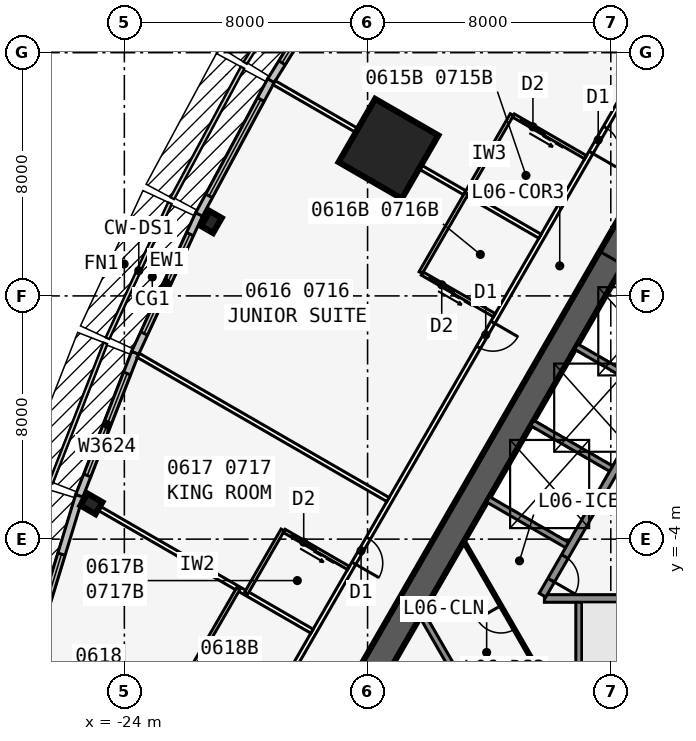
"""IFC4 building model, lengths in metres.
Left out: names, types, materials, properties, quantities, classifications, styles, units other than length and angle.
Written with IfcOpenShell. Run it as: python <this file> out.ifc"""

import sys

from ifc_helpers import new_model, si_unit, direction, frame, frame_2d, origin, origin_2d, place, context, subcontext, project, spatial, rectangle, i_section, extrude, element, fill, save


model = new_model("IFC4")
c1 = context("Model", 3, precision=1e-05, world=origin(), true_north=direction((0.0, 1.0)))
c2 = subcontext(c1, "Body", "Model", "MODEL_VIEW")
j1 = project(units=[si_unit("LENGTHUNIT", "METRE"), si_unit("PLANEANGLEUNIT", "RADIAN")], contexts=[c1])
p1 = place(None, origin())
s1 = spatial("IfcSite", under=j1, at=p1, CompositionType="ELEMENT")
p2 = place(p1, origin())
s2 = spatial("IfcBuilding", under=s1, at=p2, CompositionType="ELEMENT")
p3 = place(p2, frame((0.0, 0.0, 31.9)))
s3 = spatial("IfcBuildingStorey", under=s2, at=p3, CompositionType="ELEMENT", Elevation=31.9)
p4 = place(p3, frame((-10.183, -5.951, 0.0), z_axis=(0.0, 0.0, 1.0), x_axis=(1.0, 0.0, 0.0)))
e1 = element("IfcWall", 1, at=p4, inside=s3, PredefinedType="SOLIDWALL", context=c2, shape_type="SweptSolid", body=[
    extrude(rectangle(XDim=7.633, YDim=0.25, at=frame_2d((3.816, 0.0))), origin(), (0.0, 0.0, 1.0), 3.235),
])
p5 = place(p3, frame((-9.05, -5.951, 0.0), z_axis=(0.0, 0.0, 1.0), x_axis=(0.0, -1.0, 0.0)))
e2 = element("IfcWall", 2, at=p5, inside=s3, PredefinedType="SOLIDWALL", context=c2, shape_type="SweptSolid", body=[
    extrude(rectangle(XDim=3.125, YDim=0.2, at=frame_2d((1.562, 0.0))), origin(), (0.0, 0.0, 1.0), 3.235),
])
p6 = place(p3, frame((0.0, 19.052, 0.0), z_axis=(0.0, 0.0, 1.0), x_axis=(-0.499999749417, -0.866025548458, 0.0)))
e3 = element("IfcWall", 3, at=p6, inside=s3, PredefinedType="SHEAR", context=c2, shape_type="SweptSolid", body=[
    extrude(rectangle(XDim=33.0, YDim=0.9, at=frame_2d((16.5, 0.0))), origin(), (0.0, 0.0, 1.0), 3.4),
])
p7 = place(p6, frame((14.15, 0.0, 0.0)))
e4 = element("IfcOpeningElement", 4, at=p7, cuts=e3, PredefinedType="OPENING", context=c2, shape_type="SweptSolid", body=[
    extrude(rectangle(XDim=1.8, YDim=2.13, at=frame_2d((0.9, 1.065))), frame((0.0, 0.46, 0.0), z_axis=(0.0, -1.0, 0.0), x_axis=(1.0, 0.0, 0.0)), (0.0, 0.0, 1.0), 0.92),
])
p8 = place(p6, frame((12.6, 0.0, 0.0)))
e5 = element("IfcOpeningElement", 5, at=p8, cuts=e3, PredefinedType="OPENING", context=c2, shape_type="SweptSolid", body=[
    extrude(rectangle(XDim=1.0, YDim=2.13, at=frame_2d((0.5, 1.065))), frame((0.0, 0.46, 0.0), z_axis=(0.0, -1.0, 0.0), x_axis=(1.0, 0.0, 0.0)), (0.0, 0.0, 1.0), 0.92),
])
p9 = place(p3, frame((-4.929, 3.365, 0.0), z_axis=(0.0, 0.0, 1.0), x_axis=(-0.499991433582, -0.866030349552, 0.0)))
e6 = element("IfcWall", 6, at=p9, inside=s3, PredefinedType="SOLIDWALL", context=c2, shape_type="SweptSolid", body=[
    extrude(rectangle(XDim=10.633, YDim=0.25, at=frame_2d((5.316, 0.0))), origin(), (0.0, 0.0, 1.0), 3.235),
])
p10 = place(p9, frame((9.164, 0.0, 0.0)))
e7 = element("IfcOpeningElement", 7, at=p10, cuts=e6, PredefinedType="OPENING", context=c2, shape_type="SweptSolid", body=[
    extrude(rectangle(XDim=0.9, YDim=2.13, at=frame_2d((0.45, 1.065))), frame((0.0, 0.135, 0.0), z_axis=(0.0, -1.0, 0.0), x_axis=(1.0, 0.0, 0.0)), (0.0, 0.0, 1.0), 0.27),
])
for number, where, z_axis, x_axis in (
    (8, (-6.429, 0.767, 0.0), (0.0, 0.0, 1.0), (-0.866, 0.5, 0.0)),
    (9, (-7.879, -1.744, 0.0), (0.0, 0.0, 1.0), (-0.866, 0.5, 0.0)),
    (10, (-9.329, -4.256, 0.0), (0.0, 0.0, 1.0), (-0.866, 0.5, 0.0)),
):
    element("IfcWall", number, at=place(p3, frame(where, z_axis=z_axis, x_axis=x_axis)), inside=s3, PredefinedType="SOLIDWALL", context=c2, shape_type="SweptSolid", body=[
        extrude(rectangle(XDim=3.125, YDim=0.2, at=frame_2d((1.562, 0.0))), origin(), (0.0, 0.0, 1.0), 3.235),
    ])
for number, where, z_axis, x_axis in (
    (11, (-21.137, 6.43, 0.0), (0.0, 0.0, 1.0), (-0.866, 0.5, 0.0)),
    (12, (-25.083, -2.839, 0.0), (0.0, 0.0, 1.0), (-0.5, -0.866, 0.0)),
):
    element("IfcColumn", number, at=place(p3, frame(where, z_axis=z_axis, x_axis=x_axis)), inside=s3, PredefinedType="COLUMN", context=c2, shape_type="SweptSolid", body=[
        extrude(i_section(OverallWidth=0.455, OverallDepth=0.569, WebThickness=0.078, FlangeThickness=0.125, at=origin_2d()), origin(), (0.0, 0.0, 1.0), 3.4),
    ])
p11 = place(p3, frame((-15.312, 8.84, 0.0), z_axis=(0.0, 0.0, 1.0), x_axis=(-0.866025403784, 0.5, 0.0)))
e13 = element("IfcColumn", 13, at=p11, inside=s3, PredefinedType="COLUMN", context=c2, shape_type="SweptSolid", body=[
    extrude(rectangle(XDim=2.4, YDim=2.4, at=origin_2d()), origin(), (0.0, 0.0, 1.0), 3.4),
])
p12 = place(p3, frame((-16.551, 15.324, 0.0), z_axis=(0.0, 0.0, 1.0), x_axis=(-0.526132807704, -0.850402415717, 0.0)))
e14 = element("IfcWall", 14, at=p12, inside=s3, PredefinedType="STANDARD", context=c2, shape_type="SweptSolid", body=[
    extrude(rectangle(XDim=5.002, YDim=0.25, at=frame_2d((2.501, 0.0))), origin(), (0.0, 0.0, 1.0), 3.235),
])
p13 = place(p12, frame((0.701, 0.0, 0.45)))
e15 = element("IfcOpeningElement", 15, at=p13, cuts=e14, PredefinedType="OPENING", context=c2, shape_type="SweptSolid", body=[
    extrude(rectangle(XDim=3.6, YDim=2.4, at=frame_2d((1.8, 1.2))), frame((0.0, 0.135, 0.0), z_axis=(0.0, -1.0, 0.0), x_axis=(1.0, 0.0, 0.0)), (0.0, 0.0, 1.0), 0.27),
])
p14 = place(p3, frame((-19.178, 11.077, 0.0), z_axis=(0.0, 0.0, 1.0), x_axis=(-0.473412820489, -0.880840678782, 0.0)))
e16 = element("IfcWall", 16, at=p14, inside=s3, PredefinedType="STANDARD", context=c2, shape_type="SweptSolid", body=[
    extrude(rectangle(XDim=5.002, YDim=0.25, at=frame_2d((2.501, 0.0))), origin(), (0.0, 0.0, 1.0), 3.235),
])
p15 = place(p14, frame((0.701, 0.0, 0.45)))
e17 = element("IfcOpeningElement", 17, at=p15, cuts=e16, PredefinedType="OPENING", context=c2, shape_type="SweptSolid", body=[
    extrude(rectangle(XDim=3.6, YDim=2.4, at=frame_2d((1.8, 1.2))), frame((0.0, 0.135, 0.0), z_axis=(0.0, -1.0, 0.0), x_axis=(1.0, 0.0, 0.0)), (0.0, 0.0, 1.0), 0.27),
])
p16 = place(p3, frame((-21.543, 6.678, 0.0), z_axis=(0.0, 0.0, 1.0), x_axis=(-0.419203100754, -0.907892482796, 0.0)))
e18 = element("IfcWall", 18, at=p16, inside=s3, PredefinedType="STANDARD", context=c2, shape_type="SweptSolid", body=[
    extrude(rectangle(XDim=5.021, YDim=0.25, at=frame_2d((2.51, 0.0))), origin(), (0.0, 0.0, 1.0), 3.235),
])
p17 = place(p16, frame((0.71, 0.0, 0.45)))
e19 = element("IfcOpeningElement", 19, at=p17, cuts=e18, PredefinedType="OPENING", context=c2, shape_type="SweptSolid", body=[
    extrude(rectangle(XDim=3.6, YDim=2.4, at=frame_2d((1.8, 1.2))), frame((0.0, 0.135, 0.0), z_axis=(0.0, -1.0, 0.0), x_axis=(1.0, 0.0, 0.0)), (0.0, 0.0, 1.0), 0.27),
])
p18 = place(p3, frame((-23.645, 2.126, 0.0), z_axis=(0.0, 0.0, 1.0), x_axis=(-0.364013463868, -0.931393685894, 0.0)))
e20 = element("IfcWall", 20, at=p18, inside=s3, PredefinedType="STANDARD", context=c2, shape_type="SweptSolid", body=[
    extrude(rectangle(XDim=5.058, YDim=0.25, at=frame_2d((2.529, 0.0))), origin(), (0.0, 0.0, 1.0), 3.235),
])
p19 = place(p18, frame((0.729, 0.0, 0.45)))
e21 = element("IfcOpeningElement", 21, at=p19, cuts=e20, PredefinedType="OPENING", context=c2, shape_type="SweptSolid", body=[
    extrude(rectangle(XDim=3.6, YDim=2.4, at=frame_2d((1.8, 1.2))), frame((0.0, 0.135, 0.0), z_axis=(0.0, -1.0, 0.0), x_axis=(1.0, 0.0, 0.0)), (0.0, 0.0, 1.0), 0.27),
])
p20 = place(p3, frame((-25.483, -2.575, 0.0), z_axis=(0.0, 0.0, 1.0), x_axis=(-0.2919790669, -0.956424709265, 0.0)))
e22 = element("IfcWall", 22, at=p20, inside=s3, PredefinedType="STANDARD", context=c2, shape_type="SweptSolid", body=[
    extrude(rectangle(XDim=8.211, YDim=0.25, at=frame_2d((4.105, 0.0))), origin(), (0.0, 0.0, 1.0), 3.235),
])
p21 = place(p20, frame((2.006, 0.0, 0.45)))
e23 = element("IfcOpeningElement", 23, at=p21, cuts=e22, PredefinedType="OPENING", context=c2, shape_type="SweptSolid", body=[
    extrude(rectangle(XDim=4.2, YDim=2.4, at=frame_2d((2.1, 1.2))), frame((0.0, 0.135, 0.0), z_axis=(0.0, -1.0, 0.0), x_axis=(1.0, 0.0, 0.0)), (0.0, 0.0, 1.0), 0.27),
])
p22 = place(p3, frame((-0.5, 22.836, 0.0), z_axis=(0.0, 0.0, 1.0), x_axis=(-0.500001677587, -0.866024435227, 0.0)))
e24 = element("IfcWall", 24, at=p22, inside=s3, PredefinedType="PARTITIONING", context=c2, shape_type="SweptSolid", body=[
    extrude(rectangle(XDim=39.054, YDim=0.15, at=frame_2d((19.527, 0.0))), origin(), (0.0, 0.0, 1.0), 3.235),
])
p23 = place(p22, frame((1.558, 0.0, 0.0)))
e25 = element("IfcOpeningElement", 25, at=p23, cuts=e24, PredefinedType="OPENING", context=c2, shape_type="SweptSolid", body=[
    extrude(rectangle(XDim=0.95, YDim=2.13, at=frame_2d((0.475, 1.065))), frame((0.0, 0.085, 0.0), z_axis=(0.0, -1.0, 0.0), x_axis=(1.0, 0.0, 0.0)), (0.0, 0.0, 1.0), 0.17),
])
p24 = place(p22, frame((15.352, 0.0, 0.0)))
e26 = element("IfcOpeningElement", 26, at=p24, cuts=e24, PredefinedType="OPENING", context=c2, shape_type="SweptSolid", body=[
    extrude(rectangle(XDim=0.95, YDim=2.13, at=frame_2d((0.475, 1.065))), frame((0.0, 0.085, 0.0), z_axis=(0.0, -1.0, 0.0), x_axis=(1.0, 0.0, 0.0)), (0.0, 0.0, 1.0), 0.17),
])
p25 = place(p22, frame((22.752, 0.0, 0.0)))
e27 = element("IfcOpeningElement", 27, at=p25, cuts=e24, PredefinedType="OPENING", context=c2, shape_type="SweptSolid", body=[
    extrude(rectangle(XDim=0.95, YDim=2.13, at=frame_2d((0.475, 1.065))), frame((0.0, 0.085, 0.0), z_axis=(0.0, -1.0, 0.0), x_axis=(1.0, 0.0, 0.0)), (0.0, 0.0, 1.0), 0.17),
])
p26 = place(p22, frame((30.952, 0.0, 0.0)))
e28 = element("IfcOpeningElement", 28, at=p26, cuts=e24, PredefinedType="OPENING", context=c2, shape_type="SweptSolid", body=[
    extrude(rectangle(XDim=0.95, YDim=2.13, at=frame_2d((0.475, 1.065))), frame((0.0, 0.085, 0.0), z_axis=(0.0, -1.0, 0.0), x_axis=(1.0, 0.0, 0.0)), (0.0, 0.0, 1.0), 0.17),
])
p27 = place(p22, frame((37.752, 0.0, 0.0)))
e29 = element("IfcOpeningElement", 29, at=p27, cuts=e24, PredefinedType="OPENING", context=c2, shape_type="SweptSolid", body=[
    extrude(rectangle(XDim=0.95, YDim=2.13, at=frame_2d((0.475, 1.065))), frame((0.0, 0.085, 0.0), z_axis=(0.0, -1.0, 0.0), x_axis=(1.0, 0.0, 0.0)), (0.0, 0.0, 1.0), 0.17),
])
p28 = place(p3, frame((-10.329, 5.963, 0.0), z_axis=(0.0, 0.0, 1.0), x_axis=(-0.866021688545, 0.500006434927, 0.0)))
e30 = element("IfcWall", 30, at=p28, inside=s3, PredefinedType="PARTITIONING", context=c2, shape_type="SweptSolid", body=[
    extrude(rectangle(XDim=10.096, YDim=0.15, at=frame_2d((5.048, 0.0))), origin(), (0.0, 0.0, 1.0), 2.389),
])
p29 = place(p3, frame((-15.329, -2.697, 0.0), z_axis=(0.0, 0.0, 1.0), x_axis=(-0.866018409083, 0.500012114982, 0.0)))
e31 = element("IfcWall", 31, at=p29, inside=s3, PredefinedType="PARTITIONING", context=c2, shape_type="SweptSolid", body=[
    extrude(rectangle(XDim=9.485, YDim=0.15, at=frame_2d((4.742, 0.0))), origin(), (0.0, 0.0, 1.0), 2.389),
])
p30 = place(p3, frame((-17.829, -7.027, 0.0), z_axis=(0.0, 0.0, 1.0), x_axis=(-0.866032659912, 0.499987431809, 0.0)))
e32 = element("IfcWall", 32, at=p30, inside=s3, PredefinedType="PARTITIONING", context=c2, shape_type="SweptSolid", body=[
    extrude(rectangle(XDim=8.72, YDim=0.15, at=frame_2d((4.36, 0.0))), origin(), (0.0, 0.0, 1.0), 2.389),
])
p31 = place(p3, frame((-11.253, 9.961, 0.0), z_axis=(0.0, 0.0, 1.0), x_axis=(-0.499990139034, -0.866031096941, 0.0)))
e33 = element("IfcWall", 33, at=p31, inside=s3, PredefinedType="PLUMBINGWALL", context=c2, shape_type="SweptSolid", body=[
    extrude(rectangle(XDim=3.0, YDim=0.12, at=frame_2d((1.5, 0.0))), origin(), (0.0, 0.0, 1.0), 3.235),
])
p32 = place(p3, frame((-8.829, 8.561, 0.0), z_axis=(0.0, 0.0, 1.0), x_axis=(-0.866035715982, 0.499982138324, 0.0)))
e34 = element("IfcWall", 34, at=p32, inside=s3, PredefinedType="PLUMBINGWALL", context=c2, shape_type="SweptSolid", body=[
    extrude(rectangle(XDim=2.74, YDim=0.12, at=frame_2d((1.37, 0.0))), origin(), (0.0, 0.0, 1.0), 3.235),
])
p33 = place(p32, frame((1.55, 0.0, 0.0)))
e35 = element("IfcOpeningElement", 35, at=p33, cuts=e34, PredefinedType="OPENING", context=c2, shape_type="SweptSolid", body=[
    extrude(rectangle(XDim=0.9, YDim=2.13, at=frame_2d((0.45, 1.065))), frame((0.0, 0.07, 0.0), z_axis=(0.0, -1.0, 0.0), x_axis=(1.0, 0.0, 0.0)), (0.0, 0.0, 1.0), 0.14),
])
p34 = place(p3, frame((-12.753, 7.363, 0.0), z_axis=(0.0, 0.0, 1.0), x_axis=(-0.50002537861, -0.866010750942, 0.0)))
e36 = element("IfcWall", 36, at=p34, inside=s3, PredefinedType="PLUMBINGWALL", context=c2, shape_type="SweptSolid", body=[
    extrude(rectangle(XDim=3.0, YDim=0.12, at=frame_2d((1.5, 0.0))), origin(), (0.0, 0.0, 1.0), 3.235),
])
p35 = place(p3, frame((-11.829, 3.365, 0.0), z_axis=(0.0, 0.0, 1.0), x_axis=(-0.865997131366, 0.500048966069, 0.0)))
e37 = element("IfcWall", 37, at=p35, inside=s3, PredefinedType="PLUMBINGWALL", context=c2, shape_type="SweptSolid", body=[
    extrude(rectangle(XDim=2.74, YDim=0.12, at=frame_2d((1.37, 0.0))), origin(), (0.0, 0.0, 1.0), 3.235),
])
p36 = place(p35, frame((1.55, 0.0, 0.0)))
e38 = element("IfcOpeningElement", 38, at=p36, cuts=e37, PredefinedType="OPENING", context=c2, shape_type="SweptSolid", body=[
    extrude(rectangle(XDim=0.9, YDim=2.13, at=frame_2d((0.45, 1.065))), frame((0.0, 0.07, 0.0), z_axis=(0.0, -1.0, 0.0), x_axis=(1.0, 0.0, 0.0)), (0.0, 0.0, 1.0), 0.14),
])
p37 = place(p3, frame((-18.793, -3.699, 0.0), z_axis=(0.0, 0.0, 1.0), x_axis=(-0.500001309137, -0.866024647952, 0.0)))
e39 = element("IfcWall", 39, at=p37, inside=s3, PredefinedType="PLUMBINGWALL", context=c2, shape_type="SweptSolid", body=[
    extrude(rectangle(XDim=2.4, YDim=0.12, at=frame_2d((1.2, 0.0))), origin(), (0.0, 0.0, 1.0), 3.235),
])
p38 = place(p3, frame((-16.628, -4.949, 0.0), z_axis=(0.0, 0.0, 1.0), x_axis=(-0.866048967903, 0.499959183527, 0.0)))
e40 = element("IfcWall", 40, at=p38, inside=s3, PredefinedType="PLUMBINGWALL", context=c2, shape_type="SweptSolid", body=[
    extrude(rectangle(XDim=2.44, YDim=0.12, at=frame_2d((1.22, 0.0))), origin(), (0.0, 0.0, 1.0), 3.235),
])
p39 = place(p38, frame((1.25, 0.0, 0.0)))
e41 = element("IfcOpeningElement", 41, at=p39, cuts=e40, PredefinedType="OPENING", context=c2, shape_type="SweptSolid", body=[
    extrude(rectangle(XDim=0.9, YDim=2.13, at=frame_2d((0.45, 1.065))), frame((0.0, 0.07, 0.0), z_axis=(0.0, -1.0, 0.0), x_axis=(1.0, 0.0, 0.0)), (0.0, 0.0, 1.0), 0.14),
])
p40 = place(p3, frame((-20.253, -5.627, 0.0), z_axis=(0.0, 0.0, 1.0), x_axis=(-0.499990139034, -0.866031096941, 0.0)))
e42 = element("IfcWall", 42, at=p40, inside=s3, PredefinedType="PLUMBINGWALL", context=c2, shape_type="SweptSolid", body=[
    extrude(rectangle(XDim=3.0, YDim=0.12, at=frame_2d((1.5, 0.0))), origin(), (0.0, 0.0, 1.0), 3.235),
])
p41 = place(p3, frame((-12.719, -9.076, 0.0), z_axis=(0.0, 0.0, 1.0), x_axis=(-0.499952404951, 0.866052881055, 0.0)))
e43 = element("IfcWall", 43, at=p41, inside=s3, PredefinedType="SOLIDWALL", context=c2, shape_type="SweptSolid", body=[
    extrude(rectangle(XDim=3.002, YDim=0.2, at=frame_2d((1.501, 0.0))), origin(), (0.0, 0.0, 1.0), 3.235),
])
p42 = place(p3, frame((-9.947, -9.076, 0.0), z_axis=(0.0, 0.0, 1.0), x_axis=(-0.500027479704, 0.866009537788, 0.0)))
e44 = element("IfcWall", 44, at=p42, inside=s3, PredefinedType="PARTITIONING", context=c2, shape_type="SweptSolid", body=[
    extrude(rectangle(XDim=5.774, YDim=0.1, at=frame_2d((2.887, 0.0))), origin(), (0.0, 0.0, 1.0), 3.235),
])
p43 = place(p42, frame((2.437, 0.0, 0.0)))
e45 = element("IfcOpeningElement", 45, at=p43, cuts=e44, PredefinedType="OPENING", context=c2, shape_type="SweptSolid", body=[
    extrude(rectangle(XDim=0.9, YDim=2.13, at=frame_2d((0.45, 1.065))), frame((0.0, 0.06, 0.0), z_axis=(0.0, -1.0, 0.0), x_axis=(1.0, 0.0, 0.0)), (0.0, 0.0, 1.0), 0.12),
])
p44 = place(p13, origin())
e46 = element("IfcWindow", 46, at=p44, inside=s3, PartitioningType="SINGLE_PANEL", PredefinedType="WINDOW", context=c2, shape_type="SweptSolid", body=[
    extrude(rectangle(XDim=3.6, YDim=2.4, at=frame_2d((1.8, 1.2))), frame((0.0, 0.03, 0.0), z_axis=(0.0, -1.0, 0.0), x_axis=(1.0, 0.0, 0.0)), (0.0, 0.0, 1.0), 0.06),
])
fill(e15, e46)
p45 = place(p15, origin())
e47 = element("IfcWindow", 47, at=p45, inside=s3, PartitioningType="SINGLE_PANEL", PredefinedType="WINDOW", context=c2, shape_type="SweptSolid", body=[
    extrude(rectangle(XDim=3.6, YDim=2.4, at=frame_2d((1.8, 1.2))), frame((0.0, 0.03, 0.0), z_axis=(0.0, -1.0, 0.0), x_axis=(1.0, 0.0, 0.0)), (0.0, 0.0, 1.0), 0.06),
])
fill(e17, e47)
p46 = place(p17, origin())
e48 = element("IfcWindow", 48, at=p46, inside=s3, PartitioningType="SINGLE_PANEL", PredefinedType="WINDOW", context=c2, shape_type="SweptSolid", body=[
    extrude(rectangle(XDim=3.6, YDim=2.4, at=frame_2d((1.8, 1.2))), frame((0.0, 0.03, 0.0), z_axis=(0.0, -1.0, 0.0), x_axis=(1.0, 0.0, 0.0)), (0.0, 0.0, 1.0), 0.06),
])
fill(e19, e48)
p47 = place(p19, origin())
e49 = element("IfcWindow", 49, at=p47, inside=s3, PartitioningType="SINGLE_PANEL", PredefinedType="WINDOW", context=c2, shape_type="SweptSolid", body=[
    extrude(rectangle(XDim=3.6, YDim=2.4, at=frame_2d((1.8, 1.2))), frame((0.0, 0.03, 0.0), z_axis=(0.0, -1.0, 0.0), x_axis=(1.0, 0.0, 0.0)), (0.0, 0.0, 1.0), 0.06),
])
fill(e21, e49)
p48 = place(p21, origin())
e50 = element("IfcWindow", 50, at=p48, inside=s3, PartitioningType="SINGLE_PANEL", PredefinedType="WINDOW", context=c2, shape_type="SweptSolid", body=[
    extrude(rectangle(XDim=4.2, YDim=2.4, at=frame_2d((2.1, 1.2))), frame((0.0, 0.03, 0.0), z_axis=(0.0, -1.0, 0.0), x_axis=(1.0, 0.0, 0.0)), (0.0, 0.0, 1.0), 0.06),
])
fill(e23, e50)
p49 = place(p33, origin())
e51 = element("IfcDoor", 51, at=p49, inside=s3, OperationType="SLIDING_TO_LEFT", PredefinedType="DOOR", context=c2, shape_type="SweptSolid", body=[
    extrude(rectangle(XDim=0.9, YDim=2.13, at=frame_2d((0.45, 1.065))), frame((0.0, 0.025, 0.0), z_axis=(0.0, -1.0, 0.0), x_axis=(1.0, 0.0, 0.0)), (0.0, 0.0, 1.0), 0.05),
])
fill(e35, e51)
p50 = place(p24, origin())
e52 = element("IfcDoor", 52, at=p50, inside=s3, OperationType="SINGLE_SWING_RIGHT", PredefinedType="DOOR", context=c2, shape_type="SweptSolid", body=[
    extrude(rectangle(XDim=0.95, YDim=2.13, at=frame_2d((0.475, 1.065))), frame((0.0, 0.025, 0.0), z_axis=(0.0, -1.0, 0.0), x_axis=(1.0, 0.0, 0.0)), (0.0, 0.0, 1.0), 0.05),
])
fill(e26, e52)
p51 = place(p36, origin())
e53 = element("IfcDoor", 53, at=p51, inside=s3, OperationType="SLIDING_TO_LEFT", PredefinedType="DOOR", context=c2, shape_type="SweptSolid", body=[
    extrude(rectangle(XDim=0.9, YDim=2.13, at=frame_2d((0.45, 1.065))), frame((0.0, 0.025, 0.0), z_axis=(0.0, -1.0, 0.0), x_axis=(1.0, 0.0, 0.0)), (0.0, 0.0, 1.0), 0.05),
])
fill(e38, e53)
p52 = place(p25, origin())
e54 = element("IfcDoor", 54, at=p52, inside=s3, OperationType="SINGLE_SWING_LEFT", PredefinedType="DOOR", context=c2, shape_type="SweptSolid", body=[
    extrude(rectangle(XDim=0.95, YDim=2.13, at=frame_2d((0.475, 1.065))), frame((0.0, 0.025, 0.0), z_axis=(0.0, -1.0, 0.0), x_axis=(1.0, 0.0, 0.0)), (0.0, 0.0, 1.0), 0.05),
])
fill(e27, e54)
p53 = place(p39, origin())
e55 = element("IfcDoor", 55, at=p53, inside=s3, OperationType="SLIDING_TO_LEFT", PredefinedType="DOOR", context=c2, shape_type="SweptSolid", body=[
    extrude(rectangle(XDim=0.9, YDim=2.13, at=frame_2d((0.45, 1.065))), frame((0.0, 0.025, 0.0), z_axis=(0.0, -1.0, 0.0), x_axis=(1.0, 0.0, 0.0)), (0.0, 0.0, 1.0), 0.05),
])
fill(e41, e55)
p54 = place(p26, origin())
e56 = element("IfcDoor", 56, at=p54, inside=s3, OperationType="SINGLE_SWING_RIGHT", PredefinedType="DOOR", context=c2, shape_type="SweptSolid", body=[
    extrude(rectangle(XDim=0.95, YDim=2.13, at=frame_2d((0.475, 1.065))), frame((0.0, 0.025, 0.0), z_axis=(0.0, -1.0, 0.0), x_axis=(1.0, 0.0, 0.0)), (0.0, 0.0, 1.0), 0.05),
])
fill(e28, e56)
p55 = place(p7, origin())
e57 = element("IfcDoor", 57, at=p55, inside=s3, OperationType="DOUBLE_DOOR_SINGLE_SWING", PredefinedType="DOOR", context=c2, shape_type="SweptSolid", body=[
    extrude(rectangle(XDim=1.8, YDim=2.13, at=frame_2d((0.9, 1.065))), frame((0.0, 0.025, 0.0), z_axis=(0.0, -1.0, 0.0), x_axis=(1.0, 0.0, 0.0)), (0.0, 0.0, 1.0), 0.05),
])
fill(e4, e57)
p56 = place(p43, origin())
e58 = element("IfcDoor", 58, at=p56, inside=s3, OperationType="SINGLE_SWING_RIGHT", PredefinedType="DOOR", context=c2, shape_type="SweptSolid", body=[
    extrude(rectangle(XDim=0.9, YDim=2.13, at=frame_2d((0.45, 1.065))), frame((0.0, 0.025, 0.0), z_axis=(0.0, -1.0, 0.0), x_axis=(1.0, 0.0, 0.0)), (0.0, 0.0, 1.0), 0.05),
])
fill(e45, e58)
p57 = place(p10, origin())
e59 = element("IfcDoor", 59, at=p57, inside=s3, OperationType="SINGLE_SWING_RIGHT", PredefinedType="DOOR", context=c2, shape_type="SweptSolid", body=[
    extrude(rectangle(XDim=0.9, YDim=2.13, at=frame_2d((0.45, 1.065))), frame((0.0, 0.025, 0.0), z_axis=(0.0, -1.0, 0.0), x_axis=(1.0, 0.0, 0.0)), (0.0, 0.0, 1.0), 0.05),
])
fill(e7, e59)
save(model, sys.argv[1])
